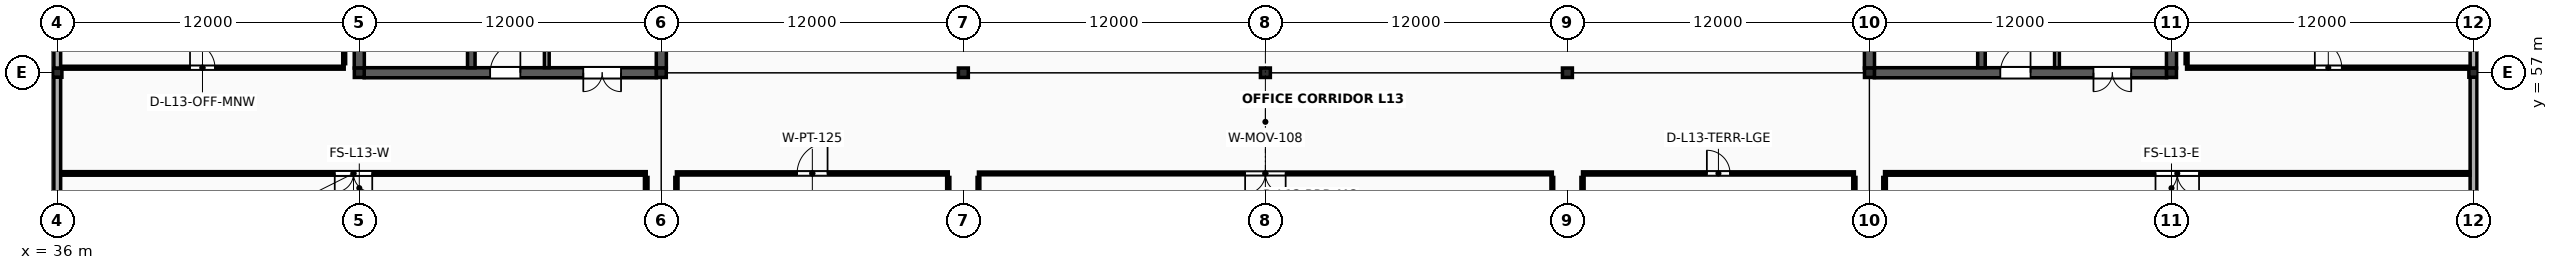
"""IFC4 building model, lengths in metres.
Left out: names, types, materials, properties, quantities, classifications, styles, units other than length and angle.
Written with IfcOpenShell. Run it as: python <this file> out.ifc"""

import sys

from ifc_helpers import new_model, si_unit, direction, frame, frame_2d, origin, origin_2d, place, context, subcontext, project, spatial, rectangle, i_section, extrude, element, fill, save


model = new_model("IFC4")
c1 = context("Model", 3, precision=1e-05, world=origin(), true_north=direction((0.0, 1.0)))
c2 = subcontext(c1, "Body", "Model", "MODEL_VIEW")
j1 = project(units=[si_unit("LENGTHUNIT", "METRE"), si_unit("PLANEANGLEUNIT", "RADIAN")], contexts=[c1])
p1 = place(None, origin())
s1 = spatial("IfcSite", under=j1, at=p1, CompositionType="ELEMENT")
p2 = place(p1, origin())
s2 = spatial("IfcBuilding", under=s1, at=p2, CompositionType="ELEMENT")
p3 = place(p2, frame((0.0, 0.0, 53.6)))
s3 = spatial("IfcBuildingStorey", under=s2, at=p3, CompositionType="ELEMENT", Elevation=53.6)
p4 = place(p3, frame((36.0, 57.0, 0.0), z_axis=(0.0, 0.0, 1.0), x_axis=(1.0, 0.0, 0.0)))
e1 = element("IfcColumn", 1, at=p4, inside=s3, PredefinedType="COLUMN", context=c2, shape_type="SweptSolid", body=[
    extrude(i_section(OverallWidth=0.369, OverallDepth=0.356, WebThickness=0.011, FlangeThickness=0.018, FilletRadius=0.018, at=origin_2d()), origin(), (0.0, 0.0, 1.0), 4.0),
])
for number, where, z_axis, x_axis in (
    (2, (48.0, 57.0, 0.0), (0.0, 0.0, 1.0), (1.0, 0.0, 0.0)),
    (3, (60.0, 57.0, 0.0), (0.0, 0.0, 1.0), (1.0, 0.0, 0.0)),
    (4, (72.0, 57.0, 0.0), (0.0, 0.0, 1.0), (1.0, 0.0, 0.0)),
    (5, (84.0, 57.0, 0.0), (0.0, 0.0, 1.0), (1.0, 0.0, 0.0)),
    (6, (96.0, 57.0, 0.0), (0.0, 0.0, 1.0), (1.0, 0.0, 0.0)),
    (7, (108.0, 57.0, 0.0), (0.0, 0.0, 1.0), (1.0, 0.0, 0.0)),
    (8, (120.0, 57.0, 0.0), (0.0, 0.0, 1.0), (1.0, 0.0, 0.0)),
):
    element("IfcColumn", number, at=place(p3, frame(where, z_axis=z_axis, x_axis=x_axis)), inside=s3, PredefinedType="COLUMN", context=c2, shape_type="SweptSolid", body=[
        extrude(i_section(OverallWidth=0.394, OverallDepth=0.375, WebThickness=0.017, FlangeThickness=0.028, FilletRadius=0.018, at=origin_2d()), origin(), (0.0, 0.0, 1.0), 4.0),
    ])
p5 = place(p3, frame((132.0, 57.0, 0.0), z_axis=(0.0, 0.0, 1.0), x_axis=(1.0, 0.0, 0.0)))
e9 = element("IfcColumn", 9, at=p5, inside=s3, PredefinedType="COLUMN", context=c2, shape_type="SweptSolid", body=[
    extrude(i_section(OverallWidth=0.369, OverallDepth=0.356, WebThickness=0.011, FlangeThickness=0.018, FilletRadius=0.018, at=origin_2d()), origin(), (0.0, 0.0, 1.0), 4.0),
])
p6 = place(p3, frame((48.194, 57.0, 0.0), z_axis=(0.0, 0.0, 1.0), x_axis=(1.0, 0.0, 0.0)))
e10 = element("IfcWall", 10, at=p6, inside=s3, PredefinedType="SHEAR", context=c2, shape_type="SweptSolid", body=[
    extrude(rectangle(XDim=11.612, YDim=0.4, at=frame_2d((5.806, 0.0))), origin(), (0.0, 0.0, 1.0), 3.818),
])
p7 = place(p6, frame((5.006, 0.0, 0.0)))
e11 = element("IfcOpeningElement", 11, at=p7, cuts=e10, PredefinedType="OPENING", context=c2, shape_type="SweptSolid", body=[
    extrude(rectangle(XDim=1.2, YDim=2.2, at=frame_2d((0.6, 1.1))), frame((0.0, 0.215, 0.0), z_axis=(0.0, -1.0, 0.0), x_axis=(1.0, 0.0, 0.0)), (0.0, 0.0, 1.0), 0.43),
])
p8 = place(p6, frame((8.706, 0.0, 0.0)))
e12 = element("IfcOpeningElement", 12, at=p8, cuts=e10, PredefinedType="OPENING", context=c2, shape_type="SweptSolid", body=[
    extrude(rectangle(XDim=1.5, YDim=2.25, at=frame_2d((0.75, 1.125))), frame((0.0, 0.215, 0.0), z_axis=(0.0, -1.0, 0.0), x_axis=(1.0, 0.0, 0.0)), (0.0, 0.0, 1.0), 0.43),
])
for number, where, z_axis, x_axis in (
    (13, (48.0, 57.185, 0.0), (0.0, 0.0, 1.0), (0.0, 1.0, 0.0)),
    (14, (60.0, 57.185, 0.0), (0.0, 0.0, 1.0), (0.0, 1.0, 0.0)),
):
    element("IfcWall", number, at=place(p3, frame(where, z_axis=z_axis, x_axis=x_axis)), inside=s3, PredefinedType="SHEAR", context=c2, shape_type="SweptSolid", body=[
        extrude(rectangle(XDim=11.64, YDim=0.4, at=frame_2d((5.82, 0.0))), origin(), (0.0, 0.0, 1.0), 3.818),
    ])
p9 = place(p3, frame((52.45, 57.197, 0.0), z_axis=(0.0, 0.0, 1.0), x_axis=(0.0, 1.0, 0.0)))
e15 = element("IfcWall", 15, at=p9, inside=s3, PredefinedType="SHEAR", context=c2, shape_type="SweptSolid", body=[
    extrude(rectangle(XDim=11.606, YDim=0.3, at=frame_2d((5.803, 0.0))), origin(), (0.0, 0.0, 1.0), 3.818),
])
p10 = place(p9, frame((0.9, 0.0, 0.0)))
e16 = element("IfcOpeningElement", 16, at=p10, cuts=e15, PredefinedType="OPENING", context=c2, shape_type="SweptSolid", body=[
    extrude(rectangle(XDim=1.1, YDim=2.2, at=frame_2d((0.55, 1.1))), frame((0.0, 0.165, 0.0), z_axis=(0.0, -1.0, 0.0), x_axis=(1.0, 0.0, 0.0)), (0.0, 0.0, 1.0), 0.33),
])
p11 = place(p3, frame((55.45, 57.2, 0.0), z_axis=(0.0, 0.0, 1.0), x_axis=(0.0, 1.0, 0.0)))
e17 = element("IfcWall", 17, at=p11, inside=s3, PredefinedType="SOLIDWALL", context=c2, shape_type="SweptSolid", body=[
    extrude(rectangle(XDim=8.48, YDim=0.19, at=frame_2d((4.24, 0.0))), origin(), (0.0, 0.0, 1.0), 3.808),
])
p12 = place(p11, frame((3.6, 0.0, 0.0)))
e18 = element("IfcOpeningElement", 18, at=p12, cuts=e17, PredefinedType="OPENING", context=c2, shape_type="SweptSolid", body=[
    extrude(rectangle(XDim=1.04, YDim=2.18, at=frame_2d((0.52, 1.09))), frame((0.0, 0.11, 0.0), z_axis=(0.0, -1.0, 0.0), x_axis=(1.0, 0.0, 0.0)), (0.0, 0.0, 1.0), 0.22),
])
p13 = place(p3, frame((108.194, 57.0, 0.0), z_axis=(0.0, 0.0, 1.0), x_axis=(1.0, 0.0, 0.0)))
e19 = element("IfcWall", 19, at=p13, inside=s3, PredefinedType="SHEAR", context=c2, shape_type="SweptSolid", body=[
    extrude(rectangle(XDim=11.612, YDim=0.4, at=frame_2d((5.806, 0.0))), origin(), (0.0, 0.0, 1.0), 3.818),
])
p14 = place(p13, frame((5.006, 0.0, 0.0)))
e20 = element("IfcOpeningElement", 20, at=p14, cuts=e19, PredefinedType="OPENING", context=c2, shape_type="SweptSolid", body=[
    extrude(rectangle(XDim=1.2, YDim=2.2, at=frame_2d((0.6, 1.1))), frame((0.0, 0.215, 0.0), z_axis=(0.0, -1.0, 0.0), x_axis=(1.0, 0.0, 0.0)), (0.0, 0.0, 1.0), 0.43),
])
p15 = place(p13, frame((8.706, 0.0, 0.0)))
e21 = element("IfcOpeningElement", 21, at=p15, cuts=e19, PredefinedType="OPENING", context=c2, shape_type="SweptSolid", body=[
    extrude(rectangle(XDim=1.5, YDim=2.25, at=frame_2d((0.75, 1.125))), frame((0.0, 0.215, 0.0), z_axis=(0.0, -1.0, 0.0), x_axis=(1.0, 0.0, 0.0)), (0.0, 0.0, 1.0), 0.43),
])
for number, where, z_axis, x_axis in (
    (22, (108.0, 57.185, 0.0), (0.0, 0.0, 1.0), (0.0, 1.0, 0.0)),
    (23, (120.0, 57.185, 0.0), (0.0, 0.0, 1.0), (0.0, 1.0, 0.0)),
):
    element("IfcWall", number, at=place(p3, frame(where, z_axis=z_axis, x_axis=x_axis)), inside=s3, PredefinedType="SHEAR", context=c2, shape_type="SweptSolid", body=[
        extrude(rectangle(XDim=11.64, YDim=0.4, at=frame_2d((5.82, 0.0))), origin(), (0.0, 0.0, 1.0), 3.818),
    ])
p16 = place(p3, frame((112.45, 57.197, 0.0), z_axis=(0.0, 0.0, 1.0), x_axis=(0.0, 1.0, 0.0)))
e24 = element("IfcWall", 24, at=p16, inside=s3, PredefinedType="SHEAR", context=c2, shape_type="SweptSolid", body=[
    extrude(rectangle(XDim=11.606, YDim=0.3, at=frame_2d((5.803, 0.0))), origin(), (0.0, 0.0, 1.0), 3.818),
])
p17 = place(p16, frame((0.9, 0.0, 0.0)))
e25 = element("IfcOpeningElement", 25, at=p17, cuts=e24, PredefinedType="OPENING", context=c2, shape_type="SweptSolid", body=[
    extrude(rectangle(XDim=1.1, YDim=2.2, at=frame_2d((0.55, 1.1))), frame((0.0, 0.165, 0.0), z_axis=(0.0, -1.0, 0.0), x_axis=(1.0, 0.0, 0.0)), (0.0, 0.0, 1.0), 0.33),
])
p18 = place(p3, frame((115.45, 57.2, 0.0), z_axis=(0.0, 0.0, 1.0), x_axis=(0.0, 1.0, 0.0)))
e26 = element("IfcWall", 26, at=p18, inside=s3, PredefinedType="SOLIDWALL", context=c2, shape_type="SweptSolid", body=[
    extrude(rectangle(XDim=8.48, YDim=0.19, at=frame_2d((4.24, 0.0))), origin(), (0.0, 0.0, 1.0), 3.808),
])
p19 = place(p18, frame((3.6, 0.0, 0.0)))
e27 = element("IfcOpeningElement", 27, at=p19, cuts=e26, PredefinedType="OPENING", context=c2, shape_type="SweptSolid", body=[
    extrude(rectangle(XDim=1.04, YDim=2.18, at=frame_2d((0.52, 1.09))), frame((0.0, 0.11, 0.0), z_axis=(0.0, -1.0, 0.0), x_axis=(1.0, 0.0, 0.0)), (0.0, 0.0, 1.0), 0.22),
])
p20 = place(p3, frame((36.0, 45.176, 0.0), z_axis=(0.0, 0.0, 1.0), x_axis=(0.0, 1.0, 0.0)))
e28 = element("IfcWall", 28, at=p20, inside=s3, PredefinedType="SOLIDWALL", context=c2, shape_type="SweptSolid", body=[
    extrude(rectangle(XDim=11.648, YDim=0.27, at=frame_2d((5.824, 0.0))), origin(), (0.0, 0.0, 1.0), 3.271),
])
p21 = place(p20, frame((4.994, 0.0, 0.78)))
e29 = element("IfcOpeningElement", 29, at=p21, cuts=e28, PredefinedType="OPENING", context=c2, shape_type="SweptSolid", body=[
    extrude(rectangle(XDim=1.66, YDim=1.58, at=frame_2d((0.83, 0.79))), frame((0.0, 0.15, 0.0), z_axis=(0.0, -1.0, 0.0), x_axis=(1.0, 0.0, 0.0)), (0.0, 0.0, 1.0), 0.3),
])
p22 = place(p3, frame((36.0, 57.176, 0.0), z_axis=(0.0, 0.0, 1.0), x_axis=(0.0, 1.0, 0.0)))
e30 = element("IfcWall", 30, at=p22, inside=s3, PredefinedType="SOLIDWALL", context=c2, shape_type="SweptSolid", body=[
    extrude(rectangle(XDim=11.648, YDim=0.27, at=frame_2d((5.824, 0.0))), origin(), (0.0, 0.0, 1.0), 3.271),
])
p23 = place(p22, frame((4.914, 0.0, 0.78)))
e31 = element("IfcOpeningElement", 31, at=p23, cuts=e30, PredefinedType="OPENING", context=c2, shape_type="SweptSolid", body=[
    extrude(rectangle(XDim=1.82, YDim=1.58, at=frame_2d((0.91, 0.79))), frame((0.0, 0.15, 0.0), z_axis=(0.0, -1.0, 0.0), x_axis=(1.0, 0.0, 0.0)), (0.0, 0.0, 1.0), 0.3),
])
p24 = place(p3, frame((132.0, 45.176, 0.0), z_axis=(0.0, 0.0, 1.0), x_axis=(0.0, 1.0, 0.0)))
e32 = element("IfcWall", 32, at=p24, inside=s3, PredefinedType="SOLIDWALL", context=c2, shape_type="SweptSolid", body=[
    extrude(rectangle(XDim=11.648, YDim=0.27, at=frame_2d((5.824, 0.0))), origin(), (0.0, 0.0, 1.0), 3.271),
])
p25 = place(p24, frame((4.834, 0.0, 0.78)))
e33 = element("IfcOpeningElement", 33, at=p25, cuts=e32, PredefinedType="OPENING", context=c2, shape_type="SweptSolid", body=[
    extrude(rectangle(XDim=1.98, YDim=1.58, at=frame_2d((0.99, 0.79))), frame((0.0, 0.15, 0.0), z_axis=(0.0, -1.0, 0.0), x_axis=(1.0, 0.0, 0.0)), (0.0, 0.0, 1.0), 0.3),
])
p26 = place(p3, frame((132.0, 57.176, 0.0), z_axis=(0.0, 0.0, 1.0), x_axis=(0.0, 1.0, 0.0)))
e34 = element("IfcWall", 34, at=p26, inside=s3, PredefinedType="SOLIDWALL", context=c2, shape_type="SweptSolid", body=[
    extrude(rectangle(XDim=11.648, YDim=0.27, at=frame_2d((5.824, 0.0))), origin(), (0.0, 0.0, 1.0), 3.271),
])
p27 = place(p26, frame((4.754, 0.0, 0.78)))
e35 = element("IfcOpeningElement", 35, at=p27, cuts=e34, PredefinedType="OPENING", context=c2, shape_type="SweptSolid", body=[
    extrude(rectangle(XDim=2.14, YDim=1.58, at=frame_2d((1.07, 0.79))), frame((0.0, 0.15, 0.0), z_axis=(0.0, -1.0, 0.0), x_axis=(1.0, 0.0, 0.0)), (0.0, 0.0, 1.0), 0.3),
])
p28 = place(p3, frame((36.14, 53.0, 0.0), z_axis=(0.0, 0.0, 1.0), x_axis=(1.0, 0.0, 0.0)))
e36 = element("IfcWall", 36, at=p28, inside=s3, PredefinedType="PARTITIONING", context=c2, shape_type="SweptSolid", body=[
    extrude(rectangle(XDim=23.26, YDim=0.14, at=frame_2d((11.63, 0.0))), origin(), (0.0, 0.0, 1.0), 2.88),
])
p29 = place(p28, frame((10.885, 0.0, 0.0)))
e37 = element("IfcOpeningElement", 37, at=p29, cuts=e36, PredefinedType="OPENING", context=c2, shape_type="SweptSolid", body=[
    extrude(rectangle(XDim=1.49, YDim=2.28, at=frame_2d((0.745, 1.14))), frame((0.0, 0.085, 0.0), z_axis=(0.0, -1.0, 0.0), x_axis=(1.0, 0.0, 0.0)), (0.0, 0.0, 1.0), 0.17),
])
p30 = place(p3, frame((59.4, 45.14, 0.0), z_axis=(0.0, 0.0, 1.0), x_axis=(0.0, 1.0, 0.0)))
e38 = element("IfcWall", 38, at=p30, inside=s3, PredefinedType="PARTITIONING", context=c2, shape_type="SweptSolid", body=[
    extrude(rectangle(XDim=7.7, YDim=0.14, at=frame_2d((3.85, 0.0))), origin(), (0.0, 0.0, 1.0), 2.88),
])
p31 = place(p3, frame((60.6, 53.0, 0.0), z_axis=(0.0, 0.0, 1.0), x_axis=(1.0, 0.0, 0.0)))
e39 = element("IfcWall", 39, at=p31, inside=s3, PredefinedType="PARTITIONING", context=c2, shape_type="SweptSolid", body=[
    extrude(rectangle(XDim=10.8, YDim=0.125, at=frame_2d((5.4, 0.0))), origin(), (0.0, 0.0, 1.0), 2.88),
])
p32 = place(p31, frame((4.795, 0.0, 0.0)))
e40 = element("IfcOpeningElement", 40, at=p32, cuts=e39, PredefinedType="OPENING", context=c2, shape_type="SweptSolid", body=[
    extrude(rectangle(XDim=1.21, YDim=2.25, at=frame_2d((0.605, 1.125))), frame((0.0, 0.077, 0.0), z_axis=(0.0, -1.0, 0.0), x_axis=(1.0, 0.0, 0.0)), (0.0, 0.0, 1.0), 0.155),
])
for number, where, z_axis, x_axis in (
    (41, (60.6, 45.14, 0.0), (0.0, 0.0, 1.0), (0.0, 1.0, 0.0)),
    (42, (71.4, 45.14, 0.0), (0.0, 0.0, 1.0), (0.0, 1.0, 0.0)),
):
    element("IfcWall", number, at=place(p3, frame(where, z_axis=z_axis, x_axis=x_axis)), inside=s3, PredefinedType="PARTITIONING", context=c2, shape_type="SweptSolid", body=[
        extrude(rectangle(XDim=7.7, YDim=0.125, at=frame_2d((3.85, 0.0))), origin(), (0.0, 0.0, 1.0), 2.88),
    ])
p33 = place(p3, frame((72.6, 53.0, 0.0), z_axis=(0.0, 0.0, 1.0), x_axis=(1.0, 0.0, 0.0)))
e43 = element("IfcWall", 43, at=p33, inside=s3, PredefinedType="MOVABLE", context=c2, shape_type="SweptSolid", body=[
    extrude(rectangle(XDim=22.8, YDim=0.108, at=frame_2d((11.4, 0.0))), origin(), (0.0, 0.0, 1.0), 2.88),
])
p34 = place(p33, frame((10.595, 0.0, 0.0)))
e44 = element("IfcOpeningElement", 44, at=p34, cuts=e43, PredefinedType="OPENING", context=c2, shape_type="SweptSolid", body=[
    extrude(rectangle(XDim=1.61, YDim=2.33, at=frame_2d((0.805, 1.165))), frame((0.0, 0.069, 0.0), z_axis=(0.0, -1.0, 0.0), x_axis=(1.0, 0.0, 0.0)), (0.0, 0.0, 1.0), 0.138),
])
for number, where, z_axis, x_axis in (
    (45, (72.6, 45.14, 0.0), (0.0, 0.0, 1.0), (0.0, 1.0, 0.0)),
    (46, (95.4, 45.14, 0.0), (0.0, 0.0, 1.0), (0.0, 1.0, 0.0)),
):
    element("IfcWall", number, at=place(p3, frame(where, z_axis=z_axis, x_axis=x_axis)), inside=s3, PredefinedType="MOVABLE", context=c2, shape_type="SweptSolid", body=[
        extrude(rectangle(XDim=7.7, YDim=0.108, at=frame_2d((3.85, 0.0))), origin(), (0.0, 0.0, 1.0), 2.88),
    ])
p35 = place(p3, frame((96.6, 53.0, 0.0), z_axis=(0.0, 0.0, 1.0), x_axis=(1.0, 0.0, 0.0)))
e47 = element("IfcWall", 47, at=p35, inside=s3, PredefinedType="PARTITIONING", context=c2, shape_type="SweptSolid", body=[
    extrude(rectangle(XDim=10.8, YDim=0.125, at=frame_2d((5.4, 0.0))), origin(), (0.0, 0.0, 1.0), 2.88),
])
p36 = place(p35, frame((4.94, 0.0, 0.0)))
e48 = element("IfcOpeningElement", 48, at=p36, cuts=e47, PredefinedType="OPENING", context=c2, shape_type="SweptSolid", body=[
    extrude(rectangle(XDim=0.92, YDim=2.1, at=frame_2d((0.46, 1.05))), frame((0.0, 0.077, 0.0), z_axis=(0.0, -1.0, 0.0), x_axis=(1.0, 0.0, 0.0)), (0.0, 0.0, 1.0), 0.155),
])
for number, where, z_axis, x_axis in (
    (49, (96.6, 45.14, 0.0), (0.0, 0.0, 1.0), (0.0, 1.0, 0.0)),
    (50, (107.4, 45.14, 0.0), (0.0, 0.0, 1.0), (0.0, 1.0, 0.0)),
):
    element("IfcWall", number, at=place(p3, frame(where, z_axis=z_axis, x_axis=x_axis)), inside=s3, PredefinedType="PARTITIONING", context=c2, shape_type="SweptSolid", body=[
        extrude(rectangle(XDim=7.7, YDim=0.125, at=frame_2d((3.85, 0.0))), origin(), (0.0, 0.0, 1.0), 2.88),
    ])
p37 = place(p3, frame((108.6, 53.0, 0.0), z_axis=(0.0, 0.0, 1.0), x_axis=(1.0, 0.0, 0.0)))
e51 = element("IfcWall", 51, at=p37, inside=s3, PredefinedType="PARTITIONING", context=c2, shape_type="SweptSolid", body=[
    extrude(rectangle(XDim=23.26, YDim=0.14, at=frame_2d((11.63, 0.0))), origin(), (0.0, 0.0, 1.0), 2.88),
])
p38 = place(p37, frame((10.765, 0.0, 0.0)))
e52 = element("IfcOpeningElement", 52, at=p38, cuts=e51, PredefinedType="OPENING", context=c2, shape_type="SweptSolid", body=[
    extrude(rectangle(XDim=1.73, YDim=2.37, at=frame_2d((0.865, 1.185))), frame((0.0, 0.085, 0.0), z_axis=(0.0, -1.0, 0.0), x_axis=(1.0, 0.0, 0.0)), (0.0, 0.0, 1.0), 0.17),
])
p39 = place(p3, frame((108.6, 45.14, 0.0), z_axis=(0.0, 0.0, 1.0), x_axis=(0.0, 1.0, 0.0)))
e53 = element("IfcWall", 53, at=p39, inside=s3, PredefinedType="PARTITIONING", context=c2, shape_type="SweptSolid", body=[
    extrude(rectangle(XDim=7.7, YDim=0.14, at=frame_2d((3.85, 0.0))), origin(), (0.0, 0.0, 1.0), 2.88),
])
p40 = place(p3, frame((36.14, 57.2, 0.0), z_axis=(0.0, 0.0, 1.0), x_axis=(1.0, 0.0, 0.0)))
e54 = element("IfcWall", 54, at=p40, inside=s3, PredefinedType="PARTITIONING", context=c2, shape_type="SweptSolid", body=[
    extrude(rectangle(XDim=11.26, YDim=0.115, at=frame_2d((5.63, 0.0))), origin(), (0.0, 0.0, 1.0), 2.88),
])
p41 = place(p40, frame((5.135, 0.0, 0.0)))
e55 = element("IfcOpeningElement", 55, at=p41, cuts=e54, PredefinedType="OPENING", context=c2, shape_type="SweptSolid", body=[
    extrude(rectangle(XDim=0.99, YDim=2.15, at=frame_2d((0.495, 1.075))), frame((0.0, 0.073, 0.0), z_axis=(0.0, -1.0, 0.0), x_axis=(1.0, 0.0, 0.0)), (0.0, 0.0, 1.0), 0.145),
])
p42 = place(p3, frame((47.4, 57.36, 0.0), z_axis=(0.0, 0.0, 1.0), x_axis=(0.0, 1.0, 0.0)))
e56 = element("IfcWall", 56, at=p42, inside=s3, PredefinedType="PARTITIONING", context=c2, shape_type="SweptSolid", body=[
    extrude(rectangle(XDim=11.5, YDim=0.115, at=frame_2d((5.75, 0.0))), origin(), (0.0, 0.0, 1.0), 2.88),
])
p43 = place(p3, frame((120.6, 57.2, 0.0), z_axis=(0.0, 0.0, 1.0), x_axis=(1.0, 0.0, 0.0)))
e57 = element("IfcWall", 57, at=p43, inside=s3, PredefinedType="PARTITIONING", context=c2, shape_type="SweptSolid", body=[
    extrude(rectangle(XDim=11.26, YDim=0.115, at=frame_2d((5.63, 0.0))), origin(), (0.0, 0.0, 1.0), 2.88),
])
p44 = place(p43, frame((5.095, 0.0, 0.0)))
e58 = element("IfcOpeningElement", 58, at=p44, cuts=e57, PredefinedType="OPENING", context=c2, shape_type="SweptSolid", body=[
    extrude(rectangle(XDim=1.07, YDim=2.19, at=frame_2d((0.535, 1.095))), frame((0.0, 0.073, 0.0), z_axis=(0.0, -1.0, 0.0), x_axis=(1.0, 0.0, 0.0)), (0.0, 0.0, 1.0), 0.145),
])
p45 = place(p3, frame((120.6, 57.36, 0.0), z_axis=(0.0, 0.0, 1.0), x_axis=(0.0, 1.0, 0.0)))
e59 = element("IfcWall", 59, at=p45, inside=s3, PredefinedType="PARTITIONING", context=c2, shape_type="SweptSolid", body=[
    extrude(rectangle(XDim=11.5, YDim=0.115, at=frame_2d((5.75, 0.0))), origin(), (0.0, 0.0, 1.0), 2.88),
])
p46 = place(p7, origin())
e60 = element("IfcDoor", 60, at=p46, inside=s3, OperationType="SINGLE_SWING_RIGHT", PredefinedType="DOOR", context=c2, shape_type="SweptSolid", body=[
    extrude(rectangle(XDim=1.2, YDim=2.2, at=frame_2d((0.6, 1.1))), frame((0.0, 0.025, 0.0), z_axis=(0.0, -1.0, 0.0), x_axis=(1.0, 0.0, 0.0)), (0.0, 0.0, 1.0), 0.05),
])
fill(e11, e60)
p47 = place(p8, origin())
e61 = element("IfcDoor", 61, at=p47, inside=s3, OperationType="DOUBLE_DOOR_SINGLE_SWING", PredefinedType="DOOR", context=c2, shape_type="SweptSolid", body=[
    extrude(rectangle(XDim=1.5, YDim=2.25, at=frame_2d((0.75, 1.125))), frame((0.0, 0.025, 0.0), z_axis=(0.0, -1.0, 0.0), x_axis=(1.0, 0.0, 0.0)), (0.0, 0.0, 1.0), 0.05),
])
fill(e12, e61)
p48 = place(p14, origin())
e62 = element("IfcDoor", 62, at=p48, inside=s3, OperationType="SINGLE_SWING_RIGHT", PredefinedType="DOOR", context=c2, shape_type="SweptSolid", body=[
    extrude(rectangle(XDim=1.2, YDim=2.2, at=frame_2d((0.6, 1.1))), frame((0.0, 0.025, 0.0), z_axis=(0.0, -1.0, 0.0), x_axis=(1.0, 0.0, 0.0)), (0.0, 0.0, 1.0), 0.05),
])
fill(e20, e62)
p49 = place(p15, origin())
e63 = element("IfcDoor", 63, at=p49, inside=s3, OperationType="DOUBLE_DOOR_SINGLE_SWING", PredefinedType="DOOR", context=c2, shape_type="SweptSolid", body=[
    extrude(rectangle(XDim=1.5, YDim=2.25, at=frame_2d((0.75, 1.125))), frame((0.0, 0.025, 0.0), z_axis=(0.0, -1.0, 0.0), x_axis=(1.0, 0.0, 0.0)), (0.0, 0.0, 1.0), 0.05),
])
fill(e21, e63)
p50 = place(p29, origin())
e64 = element("IfcDoor", 64, at=p50, inside=s3, OperationType="DOUBLE_DOOR_SINGLE_SWING", PredefinedType="DOOR", context=c2, shape_type="SweptSolid", body=[
    extrude(rectangle(XDim=1.49, YDim=2.28, at=frame_2d((0.745, 1.14))), frame((0.0, 0.025, 0.0), z_axis=(0.0, -1.0, 0.0), x_axis=(1.0, 0.0, 0.0)), (0.0, 0.0, 1.0), 0.05),
])
fill(e37, e64)
p51 = place(p32, origin())
e65 = element("IfcDoor", 65, at=p51, inside=s3, OperationType="SINGLE_SWING_RIGHT", PredefinedType="DOOR", context=c2, shape_type="SweptSolid", body=[
    extrude(rectangle(XDim=1.21, YDim=2.25, at=frame_2d((0.605, 1.125))), frame((0.0, 0.025, 0.0), z_axis=(0.0, -1.0, 0.0), x_axis=(1.0, 0.0, 0.0)), (0.0, 0.0, 1.0), 0.05),
])
fill(e40, e65)
p52 = place(p34, origin())
e66 = element("IfcDoor", 66, at=p52, inside=s3, OperationType="DOUBLE_DOOR_SINGLE_SWING", PredefinedType="DOOR", context=c2, shape_type="SweptSolid", body=[
    extrude(rectangle(XDim=1.61, YDim=2.33, at=frame_2d((0.805, 1.165))), frame((0.0, 0.025, 0.0), z_axis=(0.0, -1.0, 0.0), x_axis=(1.0, 0.0, 0.0)), (0.0, 0.0, 1.0), 0.05),
])
fill(e44, e66)
p53 = place(p36, origin())
e67 = element("IfcDoor", 67, at=p53, inside=s3, OperationType="SINGLE_SWING_LEFT", PredefinedType="DOOR", context=c2, shape_type="SweptSolid", body=[
    extrude(rectangle(XDim=0.92, YDim=2.1, at=frame_2d((0.46, 1.05))), frame((0.0, 0.025, 0.0), z_axis=(0.0, -1.0, 0.0), x_axis=(1.0, 0.0, 0.0)), (0.0, 0.0, 1.0), 0.05),
])
fill(e48, e67)
p54 = place(p38, origin())
e68 = element("IfcDoor", 68, at=p54, inside=s3, OperationType="DOUBLE_DOOR_SINGLE_SWING", PredefinedType="DOOR", context=c2, shape_type="SweptSolid", body=[
    extrude(rectangle(XDim=1.73, YDim=2.37, at=frame_2d((0.865, 1.185))), frame((0.0, 0.025, 0.0), z_axis=(0.0, -1.0, 0.0), x_axis=(1.0, 0.0, 0.0)), (0.0, 0.0, 1.0), 0.05),
])
fill(e52, e68)
p55 = place(p41, origin())
e69 = element("IfcDoor", 69, at=p55, inside=s3, OperationType="SINGLE_SWING_LEFT", PredefinedType="DOOR", context=c2, shape_type="SweptSolid", body=[
    extrude(rectangle(XDim=0.99, YDim=2.15, at=frame_2d((0.495, 1.075))), frame((0.0, 0.025, 0.0), z_axis=(0.0, -1.0, 0.0), x_axis=(1.0, 0.0, 0.0)), (0.0, 0.0, 1.0), 0.05),
])
fill(e55, e69)
p56 = place(p44, origin())
e70 = element("IfcDoor", 70, at=p56, inside=s3, OperationType="SINGLE_SWING_LEFT", PredefinedType="DOOR", context=c2, shape_type="SweptSolid", body=[
    extrude(rectangle(XDim=1.07, YDim=2.19, at=frame_2d((0.535, 1.095))), frame((0.0, 0.025, 0.0), z_axis=(0.0, -1.0, 0.0), x_axis=(1.0, 0.0, 0.0)), (0.0, 0.0, 1.0), 0.05),
])
fill(e58, e70)
save(model, sys.argv[1])
